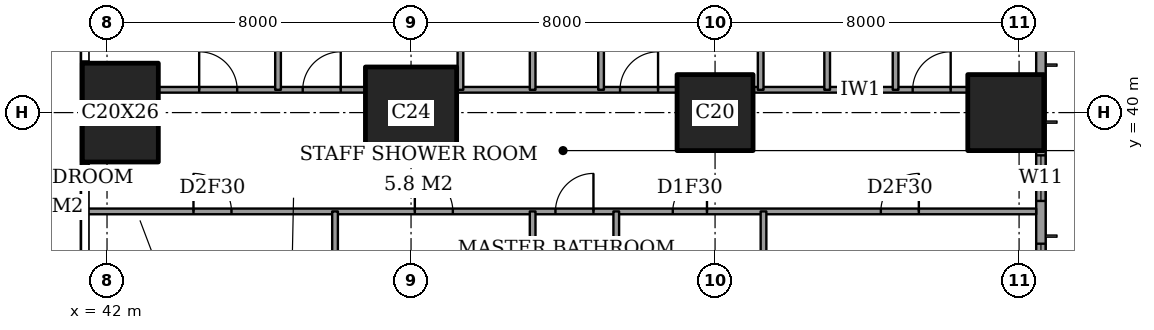
"""IFC4 building model, lengths in metres.
Left out: names, types, materials, properties, quantities, classifications, styles, units other than length and angle.
Written with IfcOpenShell. Run it as: python <this file> out.ifc"""

import sys

from ifc_helpers import new_model, si_unit, direction, frame, frame_2d, origin, origin_2d, place, context, subcontext, project, spatial, rectangle, extrude, element, fill, save


model = new_model("IFC4")
c1 = context("Model", 3, precision=1e-05, world=origin(), true_north=direction((0.0, 1.0)))
c2 = subcontext(c1, "Body", "Model", "MODEL_VIEW")
j1 = project(units=[si_unit("LENGTHUNIT", "METRE"), si_unit("PLANEANGLEUNIT", "RADIAN")], contexts=[c1])
p1 = place(None, origin())
s1 = spatial("IfcSite", under=j1, at=p1, CompositionType="ELEMENT")
p2 = place(p1, origin())
s2 = spatial("IfcBuilding", under=s1, at=p2, CompositionType="ELEMENT")
p3 = place(p2, frame((0.0, 0.0, 139.4)))
s3 = spatial("IfcBuildingStorey", under=s2, at=p3, CompositionType="ELEMENT", Elevation=139.4)
p4 = place(p3, frame((42.35, 40.0, 0.0), z_axis=(0.0, 0.0, 1.0), x_axis=(1.0, 0.0, 0.0)))
e1 = element("IfcColumn", 1, at=p4, inside=s3, PredefinedType="COLUMN", context=c2, shape_type="SweptSolid", body=[
    extrude(rectangle(XDim=2.0, YDim=2.6, at=origin_2d()), origin(), (0.0, 0.0, 1.0), 3.6),
])
p5 = place(p3, frame((50.0, 40.0, 0.0), z_axis=(0.0, 0.0, 1.0), x_axis=(1.0, 0.0, 0.0)))
e2 = element("IfcColumn", 2, at=p5, inside=s3, PredefinedType="COLUMN", context=c2, shape_type="SweptSolid", body=[
    extrude(rectangle(XDim=2.4, YDim=2.4, at=origin_2d()), origin(), (0.0, 0.0, 1.0), 3.6),
])
for number, where, z_axis, x_axis in (
    (3, (58.0, 40.0, 0.0), (0.0, 0.0, 1.0), (1.0, 0.0, 0.0)),
    (4, (65.65, 40.0, 0.0), (0.0, 0.0, 1.0), (1.0, 0.0, 0.0)),
):
    element("IfcColumn", number, at=place(p3, frame(where, z_axis=z_axis, x_axis=x_axis)), inside=s3, PredefinedType="COLUMN", context=c2, shape_type="SweptSolid", body=[
        extrude(rectangle(XDim=2.0, YDim=2.0, at=origin_2d()), origin(), (0.0, 0.0, 1.0), 3.6),
    ])
p6 = place(p3, frame((66.575, 3.175, 0.0), z_axis=(0.0, 0.0, 1.0), x_axis=(0.0, 1.0, 0.0)))
e5 = element("IfcWall", 5, at=p6, inside=s3, PredefinedType="SOLIDWALL", context=c2, shape_type="SweptSolid", body=[
    extrude(rectangle(XDim=41.65, YDim=0.25, at=frame_2d((20.825, 0.0))), origin(), (0.0, 0.0, 1.0), 3.6),
])
p7 = place(p6, frame((0.775, 0.0, 0.4)))
e6 = element("IfcOpeningElement", 6, at=p7, cuts=e5, PredefinedType="OPENING", context=c2, shape_type="SweptSolid", body=[
    extrude(rectangle(XDim=2.4, YDim=2.2, at=frame_2d((1.2, 1.1))), frame((0.0, 0.135, 0.0), z_axis=(0.0, -1.0, 0.0), x_axis=(1.0, 0.0, 0.0)), (0.0, 0.0, 1.0), 0.27),
])
p8 = place(p6, frame((6.1, 0.0, 0.4)))
e7 = element("IfcOpeningElement", 7, at=p8, cuts=e5, PredefinedType="OPENING", context=c2, shape_type="SweptSolid", body=[
    extrude(rectangle(XDim=1.2, YDim=2.2, at=frame_2d((0.6, 1.1))), frame((0.0, 0.135, 0.0), z_axis=(0.0, -1.0, 0.0), x_axis=(1.0, 0.0, 0.0)), (0.0, 0.0, 1.0), 0.27),
])
p9 = place(p6, frame((8.275, 0.0, 0.4)))
e8 = element("IfcOpeningElement", 8, at=p9, cuts=e5, PredefinedType="OPENING", context=c2, shape_type="SweptSolid", body=[
    extrude(rectangle(XDim=2.4, YDim=2.2, at=frame_2d((1.2, 1.1))), frame((0.0, 0.135, 0.0), z_axis=(0.0, -1.0, 0.0), x_axis=(1.0, 0.0, 0.0)), (0.0, 0.0, 1.0), 0.27),
])
p10 = place(p6, frame((15.775, 0.0, 0.4)))
e9 = element("IfcOpeningElement", 9, at=p10, cuts=e5, PredefinedType="OPENING", context=c2, shape_type="SweptSolid", body=[
    extrude(rectangle(XDim=2.4, YDim=2.2, at=frame_2d((1.2, 1.1))), frame((0.0, 0.135, 0.0), z_axis=(0.0, -1.0, 0.0), x_axis=(1.0, 0.0, 0.0)), (0.0, 0.0, 1.0), 0.27),
])
p11 = place(p6, frame((23.475, 0.0, 0.4)))
e10 = element("IfcOpeningElement", 10, at=p11, cuts=e5, PredefinedType="OPENING", context=c2, shape_type="SweptSolid", body=[
    extrude(rectangle(XDim=2.4, YDim=2.2, at=frame_2d((1.2, 1.1))), frame((0.0, 0.135, 0.0), z_axis=(0.0, -1.0, 0.0), x_axis=(1.0, 0.0, 0.0)), (0.0, 0.0, 1.0), 0.27),
])
p12 = place(p6, frame((30.975, 0.0, 0.4)))
e11 = element("IfcOpeningElement", 11, at=p12, cuts=e5, PredefinedType="OPENING", context=c2, shape_type="SweptSolid", body=[
    extrude(rectangle(XDim=2.4, YDim=2.2, at=frame_2d((1.2, 1.1))), frame((0.0, 0.135, 0.0), z_axis=(0.0, -1.0, 0.0), x_axis=(1.0, 0.0, 0.0)), (0.0, 0.0, 1.0), 0.27),
])
p13 = place(p6, frame((34.5, 0.0, 0.4)))
e12 = element("IfcOpeningElement", 12, at=p13, cuts=e5, PredefinedType="OPENING", context=c2, shape_type="SweptSolid", body=[
    extrude(rectangle(XDim=1.2, YDim=2.2, at=frame_2d((0.6, 1.1))), frame((0.0, 0.135, 0.0), z_axis=(0.0, -1.0, 0.0), x_axis=(1.0, 0.0, 0.0)), (0.0, 0.0, 1.0), 0.27),
])
p14 = place(p6, frame((38.475, 0.0, 0.4)))
e13 = element("IfcOpeningElement", 13, at=p14, cuts=e5, PredefinedType="OPENING", context=c2, shape_type="SweptSolid", body=[
    extrude(rectangle(XDim=2.4, YDim=2.2, at=frame_2d((1.2, 1.1))), frame((0.0, 0.135, 0.0), z_axis=(0.0, -1.0, 0.0), x_axis=(1.0, 0.0, 0.0)), (0.0, 0.0, 1.0), 0.27),
])
p15 = place(p3, frame((41.439, 37.4, 0.0), z_axis=(0.0, 0.0, 1.0), x_axis=(1.0, 0.0, 0.0)))
e14 = element("IfcWall", 14, at=p15, inside=s3, PredefinedType="PARTITIONING", context=c2, shape_type="SweptSolid", body=[
    extrude(rectangle(XDim=25.011, YDim=0.15, at=frame_2d((12.505, 0.0))), origin(), (0.0, 0.0, 1.0), 3.35),
])
p16 = place(p15, frame((12.361, 0.0, 0.0)))
e15 = element("IfcOpeningElement", 15, at=p16, cuts=e14, PredefinedType="OPENING", context=c2, shape_type="SweptSolid", body=[
    extrude(rectangle(XDim=1.0, YDim=2.1, at=frame_2d((0.5, 1.05))), frame((0.0, 0.085, 0.0), z_axis=(0.0, -1.0, 0.0), x_axis=(1.0, 0.0, 0.0)), (0.0, 0.0, 1.0), 0.17),
])
p17 = place(p15, frame((20.924, 0.0, 0.0)))
e16 = element("IfcOpeningElement", 16, at=p17, cuts=e14, PredefinedType="OPENING", context=c2, shape_type="SweptSolid", body=[
    extrude(rectangle(XDim=1.0, YDim=2.1, at=frame_2d((0.5, 1.05))), frame((0.0, 0.085, 0.0), z_axis=(0.0, -1.0, 0.0), x_axis=(1.0, 0.0, 0.0)), (0.0, 0.0, 1.0), 0.17),
])
p18 = place(p15, frame((15.448, 0.0, 0.0)))
e17 = element("IfcOpeningElement", 17, at=p18, cuts=e14, PredefinedType="OPENING", context=c2, shape_type="SweptSolid", body=[
    extrude(rectangle(XDim=0.9, YDim=2.1, at=frame_2d((0.45, 1.05))), frame((0.0, 0.085, 0.0), z_axis=(0.0, -1.0, 0.0), x_axis=(1.0, 0.0, 0.0)), (0.0, 0.0, 1.0), 0.17),
])
p19 = place(p15, frame((8.661, 0.0, 0.0)))
e18 = element("IfcOpeningElement", 18, at=p19, cuts=e14, PredefinedType="OPENING", context=c2, shape_type="SweptSolid", body=[
    extrude(rectangle(XDim=1.0, YDim=2.1, at=frame_2d((0.5, 1.05))), frame((0.0, 0.085, 0.0), z_axis=(0.0, -1.0, 0.0), x_axis=(1.0, 0.0, 0.0)), (0.0, 0.0, 1.0), 0.17),
])
p20 = place(p15, frame((2.836, 0.0, 0.0)))
e19 = element("IfcOpeningElement", 19, at=p20, cuts=e14, PredefinedType="OPENING", context=c2, shape_type="SweptSolid", body=[
    extrude(rectangle(XDim=1.0, YDim=2.1, at=frame_2d((0.5, 1.05))), frame((0.0, 0.085, 0.0), z_axis=(0.0, -1.0, 0.0), x_axis=(1.0, 0.0, 0.0)), (0.0, 0.0, 1.0), 0.17),
])
p21 = place(p3, frame((43.35, 40.6, 0.0), z_axis=(0.0, 0.0, 1.0), x_axis=(1.0, 0.0, 0.0)))
e20 = element("IfcWall", 20, at=p21, inside=s3, PredefinedType="PARTITIONING", context=c2, shape_type="SweptSolid", body=[
    extrude(rectangle(XDim=5.45, YDim=0.15, at=frame_2d((2.725, 0.0))), origin(), (0.0, 0.0, 1.0), 3.35),
])
p22 = place(p21, frame((3.8, 0.0, 0.0)))
e21 = element("IfcOpeningElement", 21, at=p22, cuts=e20, PredefinedType="OPENING", context=c2, shape_type="SweptSolid", body=[
    extrude(rectangle(XDim=1.0, YDim=2.1, at=frame_2d((0.5, 1.05))), frame((0.0, 0.085, 0.0), z_axis=(0.0, -1.0, 0.0), x_axis=(1.0, 0.0, 0.0)), (0.0, 0.0, 1.0), 0.17),
])
p23 = place(p21, frame((1.075, 0.0, 0.0)))
e22 = element("IfcOpeningElement", 22, at=p23, cuts=e20, PredefinedType="OPENING", context=c2, shape_type="SweptSolid", body=[
    extrude(rectangle(XDim=1.0, YDim=2.1, at=frame_2d((0.5, 1.05))), frame((0.0, 0.085, 0.0), z_axis=(0.0, -1.0, 0.0), x_axis=(1.0, 0.0, 0.0)), (0.0, 0.0, 1.0), 0.17),
])
p24 = place(p3, frame((51.2, 40.6, 0.0), z_axis=(0.0, 0.0, 1.0), x_axis=(1.0, 0.0, 0.0)))
e23 = element("IfcWall", 23, at=p24, inside=s3, PredefinedType="PARTITIONING", context=c2, shape_type="SweptSolid", body=[
    extrude(rectangle(XDim=5.8, YDim=0.15, at=frame_2d((2.9, 0.0))), origin(), (0.0, 0.0, 1.0), 3.35),
])
p25 = place(p24, frame((4.3, 0.0, 0.0)))
e24 = element("IfcOpeningElement", 24, at=p25, cuts=e23, PredefinedType="OPENING", context=c2, shape_type="SweptSolid", body=[
    extrude(rectangle(XDim=1.0, YDim=2.1, at=frame_2d((0.5, 1.05))), frame((0.0, 0.085, 0.0), z_axis=(0.0, -1.0, 0.0), x_axis=(1.0, 0.0, 0.0)), (0.0, 0.0, 1.0), 0.17),
])
p26 = place(p3, frame((59.0, 40.6, 0.0), z_axis=(0.0, 0.0, 1.0), x_axis=(1.0, 0.0, 0.0)))
e25 = element("IfcWall", 25, at=p26, inside=s3, PredefinedType="PARTITIONING", context=c2, shape_type="SweptSolid", body=[
    extrude(rectangle(XDim=5.65, YDim=0.15, at=frame_2d((2.825, 0.0))), origin(), (0.0, 0.0, 1.0), 3.35),
])
p27 = place(p26, frame((4.2, 0.0, 0.0)))
e26 = element("IfcOpeningElement", 26, at=p27, cuts=e25, PredefinedType="OPENING", context=c2, shape_type="SweptSolid", body=[
    extrude(rectangle(XDim=1.0, YDim=2.1, at=frame_2d((0.5, 1.05))), frame((0.0, 0.085, 0.0), z_axis=(0.0, -1.0, 0.0), x_axis=(1.0, 0.0, 0.0)), (0.0, 0.0, 1.0), 0.17),
])
p28 = place(p3, frame((46.5, 40.6, 0.0), z_axis=(0.0, 0.0, 1.0), x_axis=(0.0, 1.0, 0.0)))
e27 = element("IfcWall", 27, at=p28, inside=s3, PredefinedType="PARTITIONING", context=c2, shape_type="SweptSolid", body=[
    extrude(rectangle(XDim=7.85, YDim=0.15, at=frame_2d((3.925, 0.0))), origin(), (0.0, 0.0, 1.0), 3.35),
])
p29 = place(p3, frame((48.0, 28.0, 0.0), z_axis=(0.0, 0.0, 1.0), x_axis=(0.0, 1.0, 0.0)))
e28 = element("IfcWall", 28, at=p29, inside=s3, PredefinedType="PARTITIONING", context=c2, shape_type="SweptSolid", body=[
    extrude(rectangle(XDim=9.4, YDim=0.15, at=frame_2d((4.7, 0.0))), origin(), (0.0, 0.0, 1.0), 3.35),
])
p30 = place(p29, frame((0.837, 0.0, 0.0)))
e29 = element("IfcOpeningElement", 29, at=p30, cuts=e28, PredefinedType="OPENING", context=c2, shape_type="SweptSolid", body=[
    extrude(rectangle(XDim=1.0, YDim=2.1, at=frame_2d((0.5, 1.05))), frame((0.0, 0.085, 0.0), z_axis=(0.0, -1.0, 0.0), x_axis=(1.0, 0.0, 0.0)), (0.0, 0.0, 1.0), 0.17),
])
p31 = place(p3, frame((51.3, 40.6, 0.0), z_axis=(0.0, 0.0, 1.0), x_axis=(0.0, 1.0, 0.0)))
e30 = element("IfcWall", 30, at=p31, inside=s3, PredefinedType="PARTITIONING", context=c2, shape_type="SweptSolid", body=[
    extrude(rectangle(XDim=7.85, YDim=0.15, at=frame_2d((3.925, 0.0))), origin(), (0.0, 0.0, 1.0), 3.35),
])
p32 = place(p31, frame((3.475, 0.0, 0.0)))
e31 = element("IfcOpeningElement", 31, at=p32, cuts=e30, PredefinedType="OPENING", context=c2, shape_type="SweptSolid", body=[
    extrude(rectangle(XDim=0.9, YDim=2.1, at=frame_2d((0.45, 1.05))), frame((0.0, 0.085, 0.0), z_axis=(0.0, -1.0, 0.0), x_axis=(1.0, 0.0, 0.0)), (0.0, 0.0, 1.0), 0.17),
])
p33 = place(p3, frame((53.2, 30.675, 0.0), z_axis=(0.0, 0.0, 1.0), x_axis=(0.0, 1.0, 0.0)))
e32 = element("IfcWall", 32, at=p33, inside=s3, PredefinedType="PARTITIONING", context=c2, shape_type="SweptSolid", body=[
    extrude(rectangle(XDim=6.725, YDim=0.15, at=frame_2d((3.362, 0.0))), origin(), (0.0, 0.0, 1.0), 3.35),
])
p34 = place(p3, frame((53.2, 40.6, 0.0), z_axis=(0.0, 0.0, 1.0), x_axis=(0.0, 1.0, 0.0)))
e33 = element("IfcWall", 33, at=p34, inside=s3, PredefinedType="PARTITIONING", context=c2, shape_type="SweptSolid", body=[
    extrude(rectangle(XDim=7.85, YDim=0.15, at=frame_2d((3.925, 0.0))), origin(), (0.0, 0.0, 1.0), 3.35),
])
p35 = place(p3, frame((55.0, 40.6, 0.0), z_axis=(0.0, 0.0, 1.0), x_axis=(0.0, 1.0, 0.0)))
e34 = element("IfcWall", 34, at=p35, inside=s3, PredefinedType="PARTITIONING", context=c2, shape_type="SweptSolid", body=[
    extrude(rectangle(XDim=7.85, YDim=0.15, at=frame_2d((3.925, 0.0))), origin(), (0.0, 0.0, 1.0), 3.35),
])
p36 = place(p35, frame((3.475, 0.0, 0.0)))
e35 = element("IfcOpeningElement", 35, at=p36, cuts=e34, PredefinedType="OPENING", context=c2, shape_type="SweptSolid", body=[
    extrude(rectangle(XDim=0.9, YDim=2.1, at=frame_2d((0.45, 1.05))), frame((0.0, 0.085, 0.0), z_axis=(0.0, -1.0, 0.0), x_axis=(1.0, 0.0, 0.0)), (0.0, 0.0, 1.0), 0.17),
])
p37 = place(p3, frame((55.4, 28.0, 0.0), z_axis=(0.0, 0.0, 1.0), x_axis=(0.0, 1.0, 0.0)))
e36 = element("IfcWall", 36, at=p37, inside=s3, PredefinedType="PARTITIONING", context=c2, shape_type="SweptSolid", body=[
    extrude(rectangle(XDim=9.4, YDim=0.15, at=frame_2d((4.7, 0.0))), origin(), (0.0, 0.0, 1.0), 3.35),
])
p38 = place(p37, frame((0.837, 0.0, 0.0)))
e37 = element("IfcOpeningElement", 37, at=p38, cuts=e36, PredefinedType="OPENING", context=c2, shape_type="SweptSolid", body=[
    extrude(rectangle(XDim=1.0, YDim=2.1, at=frame_2d((0.5, 1.05))), frame((0.0, 0.085, 0.0), z_axis=(0.0, -1.0, 0.0), x_axis=(1.0, 0.0, 0.0)), (0.0, 0.0, 1.0), 0.17),
])
p39 = place(p3, frame((59.2, 40.6, 0.0), z_axis=(0.0, 0.0, 1.0), x_axis=(0.0, 1.0, 0.0)))
e38 = element("IfcWall", 38, at=p39, inside=s3, PredefinedType="PARTITIONING", context=c2, shape_type="SweptSolid", body=[
    extrude(rectangle(XDim=7.85, YDim=0.15, at=frame_2d((3.925, 0.0))), origin(), (0.0, 0.0, 1.0), 3.35),
])
p40 = place(p3, frame((59.275, 33.2, 0.0), z_axis=(0.0, 0.0, 1.0), x_axis=(0.0, 1.0, 0.0)))
e39 = element("IfcWall", 39, at=p40, inside=s3, PredefinedType="PARTITIONING", context=c2, shape_type="SweptSolid", body=[
    extrude(rectangle(XDim=4.2, YDim=0.15, at=frame_2d((2.1, 0.0))), origin(), (0.0, 0.0, 1.0), 3.35),
])
p41 = place(p3, frame((60.95, 40.6, 0.0), z_axis=(0.0, 0.0, 1.0), x_axis=(0.0, 1.0, 0.0)))
e40 = element("IfcWall", 40, at=p41, inside=s3, PredefinedType="PARTITIONING", context=c2, shape_type="SweptSolid", body=[
    extrude(rectangle(XDim=7.85, YDim=0.15, at=frame_2d((3.925, 0.0))), origin(), (0.0, 0.0, 1.0), 3.35),
])
p42 = place(p41, frame((5.225, 0.0, 0.0)))
e41 = element("IfcOpeningElement", 41, at=p42, cuts=e40, PredefinedType="OPENING", context=c2, shape_type="SweptSolid", body=[
    extrude(rectangle(XDim=0.9, YDim=2.1, at=frame_2d((0.45, 1.05))), frame((0.0, 0.085, 0.0), z_axis=(0.0, -1.0, 0.0), x_axis=(1.0, 0.0, 0.0)), (0.0, 0.0, 1.0), 0.17),
])
p43 = place(p3, frame((62.75, 40.6, 0.0), z_axis=(0.0, 0.0, 1.0), x_axis=(0.0, 1.0, 0.0)))
e42 = element("IfcWall", 42, at=p43, inside=s3, PredefinedType="PARTITIONING", context=c2, shape_type="SweptSolid", body=[
    extrude(rectangle(XDim=3.5, YDim=0.15, at=frame_2d((1.75, 0.0))), origin(), (0.0, 0.0, 1.0), 3.35),
])
p44 = place(p43, frame((1.3, 0.0, 0.0)))
e43 = element("IfcOpeningElement", 43, at=p44, cuts=e42, PredefinedType="OPENING", context=c2, shape_type="SweptSolid", body=[
    extrude(rectangle(XDim=0.9, YDim=2.1, at=frame_2d((0.45, 1.05))), frame((0.0, 0.085, 0.0), z_axis=(0.0, -1.0, 0.0), x_axis=(1.0, 0.0, 0.0)), (0.0, 0.0, 1.0), 0.17),
])
p45 = place(p12, origin())
e44 = element("IfcWindow", 44, at=p45, inside=s3, PartitioningType="SINGLE_PANEL", PredefinedType="WINDOW", context=c2, shape_type="SweptSolid", body=[
    extrude(rectangle(XDim=2.4, YDim=2.2, at=frame_2d((1.2, 1.1))), frame((0.0, 0.03, 0.0), z_axis=(0.0, -1.0, 0.0), x_axis=(1.0, 0.0, 0.0)), (0.0, 0.0, 1.0), 0.06),
])
fill(e11, e44)
p46 = place(p13, origin())
e45 = element("IfcWindow", 45, at=p46, inside=s3, PartitioningType="SINGLE_PANEL", PredefinedType="WINDOW", context=c2, shape_type="SweptSolid", body=[
    extrude(rectangle(XDim=1.2, YDim=2.2, at=frame_2d((0.6, 1.1))), frame((0.0, 0.03, 0.0), z_axis=(0.0, -1.0, 0.0), x_axis=(1.0, 0.0, 0.0)), (0.0, 0.0, 1.0), 0.06),
])
fill(e12, e45)
p47 = place(p27, origin())
e46 = element("IfcDoor", 46, at=p47, inside=s3, OperationType="SINGLE_SWING_LEFT", PredefinedType="DOOR", context=c2, shape_type="SweptSolid", body=[
    extrude(rectangle(XDim=1.0, YDim=2.1, at=frame_2d((0.5, 1.05))), frame((0.0, 0.025, 0.0), z_axis=(0.0, -1.0, 0.0), x_axis=(1.0, 0.0, 0.0)), (0.0, 0.0, 1.0), 0.05),
])
fill(e26, e46)
p48 = place(p25, origin())
e47 = element("IfcDoor", 47, at=p48, inside=s3, OperationType="SINGLE_SWING_LEFT", PredefinedType="DOOR", context=c2, shape_type="SweptSolid", body=[
    extrude(rectangle(XDim=1.0, YDim=2.1, at=frame_2d((0.5, 1.05))), frame((0.0, 0.025, 0.0), z_axis=(0.0, -1.0, 0.0), x_axis=(1.0, 0.0, 0.0)), (0.0, 0.0, 1.0), 0.05),
])
fill(e24, e47)
p49 = place(p22, origin())
e48 = element("IfcDoor", 48, at=p49, inside=s3, OperationType="SINGLE_SWING_LEFT", PredefinedType="DOOR", context=c2, shape_type="SweptSolid", body=[
    extrude(rectangle(XDim=1.0, YDim=2.1, at=frame_2d((0.5, 1.05))), frame((0.0, 0.025, 0.0), z_axis=(0.0, -1.0, 0.0), x_axis=(1.0, 0.0, 0.0)), (0.0, 0.0, 1.0), 0.05),
])
fill(e21, e48)
p50 = place(p23, origin())
e49 = element("IfcDoor", 49, at=p50, inside=s3, OperationType="SINGLE_SWING_RIGHT", PredefinedType="DOOR", context=c2, shape_type="SweptSolid", body=[
    extrude(rectangle(XDim=1.0, YDim=2.1, at=frame_2d((0.5, 1.05))), frame((0.0, 0.025, 0.0), z_axis=(0.0, -1.0, 0.0), x_axis=(1.0, 0.0, 0.0)), (0.0, 0.0, 1.0), 0.05),
])
fill(e22, e49)
p51 = place(p16, origin())
e50 = element("IfcDoor", 50, at=p51, inside=s3, OperationType="SINGLE_SWING_LEFT", PredefinedType="DOOR", context=c2, shape_type="SweptSolid", body=[
    extrude(rectangle(XDim=1.0, YDim=2.1, at=frame_2d((0.5, 1.05))), frame((0.0, 0.025, 0.0), z_axis=(0.0, -1.0, 0.0), x_axis=(1.0, 0.0, 0.0)), (0.0, 0.0, 1.0), 0.05),
])
fill(e15, e50)
p52 = place(p17, origin())
e51 = element("IfcDoor", 51, at=p52, inside=s3, OperationType="SINGLE_SWING_LEFT", PredefinedType="DOOR", context=c2, shape_type="SweptSolid", body=[
    extrude(rectangle(XDim=1.0, YDim=2.1, at=frame_2d((0.5, 1.05))), frame((0.0, 0.025, 0.0), z_axis=(0.0, -1.0, 0.0), x_axis=(1.0, 0.0, 0.0)), (0.0, 0.0, 1.0), 0.05),
])
fill(e16, e51)
p53 = place(p18, origin())
e52 = element("IfcDoor", 52, at=p53, inside=s3, OperationType="SINGLE_SWING_LEFT", PredefinedType="DOOR", context=c2, shape_type="SweptSolid", body=[
    extrude(rectangle(XDim=0.9, YDim=2.1, at=frame_2d((0.45, 1.05))), frame((0.0, 0.025, 0.0), z_axis=(0.0, -1.0, 0.0), x_axis=(1.0, 0.0, 0.0)), (0.0, 0.0, 1.0), 0.05),
])
fill(e17, e52)
p54 = place(p19, origin())
e53 = element("IfcDoor", 53, at=p54, inside=s3, OperationType="SINGLE_SWING_RIGHT", PredefinedType="DOOR", context=c2, shape_type="SweptSolid", body=[
    extrude(rectangle(XDim=1.0, YDim=2.1, at=frame_2d((0.5, 1.05))), frame((0.0, 0.025, 0.0), z_axis=(0.0, -1.0, 0.0), x_axis=(1.0, 0.0, 0.0)), (0.0, 0.0, 1.0), 0.05),
])
fill(e18, e53)
p55 = place(p20, origin())
e54 = element("IfcDoor", 54, at=p55, inside=s3, OperationType="SINGLE_SWING_RIGHT", PredefinedType="DOOR", context=c2, shape_type="SweptSolid", body=[
    extrude(rectangle(XDim=1.0, YDim=2.1, at=frame_2d((0.5, 1.05))), frame((0.0, 0.025, 0.0), z_axis=(0.0, -1.0, 0.0), x_axis=(1.0, 0.0, 0.0)), (0.0, 0.0, 1.0), 0.05),
])
fill(e19, e54)
save(model, sys.argv[1])
